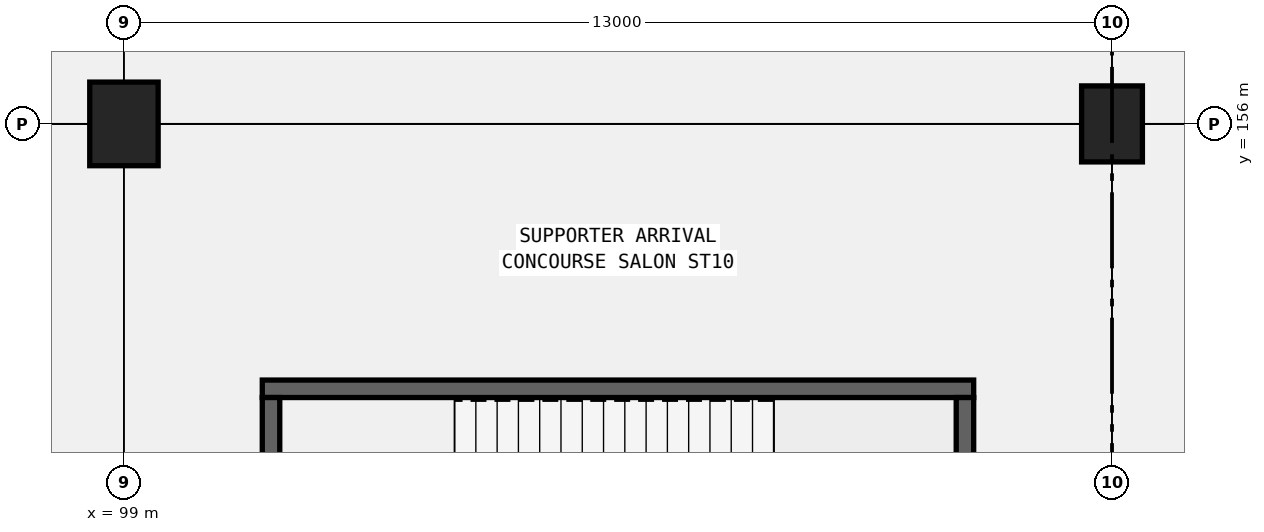
"""IFC4 building model, lengths in metres.
Left out: names, types, materials, properties, quantities, classifications, styles, units other than length and angle.
Written with IfcOpenShell. Run it as: python <this file> out.ifc"""

import sys

from ifc_helpers import new_model, si_unit, direction, frame, frame_2d, origin, origin_2d, place, context, subcontext, project, spatial, rectangle, extrude, element, save


model = new_model("IFC4")
c1 = context("Model", 3, precision=1e-05, world=origin(), true_north=direction((0.0, 1.0)))
c2 = subcontext(c1, "Body", "Model", "MODEL_VIEW")
j1 = project(units=[si_unit("LENGTHUNIT", "METRE"), si_unit("PLANEANGLEUNIT", "RADIAN")], contexts=[c1])
p1 = place(None, origin())
s1 = spatial("IfcSite", under=j1, at=p1, CompositionType="ELEMENT")
p2 = place(p1, origin())
s2 = spatial("IfcBuilding", under=s1, at=p2, CompositionType="ELEMENT")
p3 = place(p2, origin())
s3 = spatial("IfcBuildingStorey", under=s2, at=p3, CompositionType="ELEMENT", Elevation=0.0)
p4 = place(p3, frame((99.0, 156.0, 0.0), z_axis=(0.0, 0.0, 1.0), x_axis=(1.0, 0.0, 0.0)))
e1 = element("IfcColumn", 1, at=p4, inside=s3, PredefinedType="COLUMN", context=c2, shape_type="SweptSolid", body=[
    extrude(rectangle(XDim=0.9, YDim=1.1, at=origin_2d()), origin(), (0.0, 0.0, 1.0), 5.4),
])
p5 = place(p3, frame((112.0, 156.0, 0.0), z_axis=(0.0, 0.0, 1.0), x_axis=(1.0, 0.0, 0.0)))
e2 = element("IfcColumn", 2, at=p5, inside=s3, PredefinedType="COLUMN", context=c2, shape_type="SweptSolid", body=[
    extrude(rectangle(XDim=0.8, YDim=1.0, at=origin_2d()), origin(), (0.0, 0.0, 1.0), 5.4),
])
p6 = place(p3, frame((100.82, 152.515, 0.0), z_axis=(0.0, 0.0, 1.0), x_axis=(1.0, 0.0, 0.0)))
e3 = element("IfcWall", 3, at=p6, inside=s3, PredefinedType="SHEAR", context=c2, shape_type="SweptSolid", body=[
    extrude(rectangle(XDim=9.36, YDim=0.23, at=frame_2d((4.68, 0.0))), origin(), (0.0, 0.0, 1.0), 5.14),
])
for number, where, z_axis, x_axis in (
    (4, (100.935, 147.6, 0.0), (0.0, 0.0, 1.0), (0.0, 1.0, 0.0)),
    (5, (110.065, 147.6, 0.0), (0.0, 0.0, 1.0), (0.0, 1.0, 0.0)),
):
    element("IfcWall", number, at=place(p3, frame(where, z_axis=z_axis, x_axis=x_axis)), inside=s3, PredefinedType="SHEAR", context=c2, shape_type="SweptSolid", body=[
        extrude(rectangle(XDim=4.8, YDim=0.23, at=frame_2d((2.4, 0.0))), origin(), (0.0, 0.0, 1.0), 5.14),
    ])
save(model, sys.argv[1])
